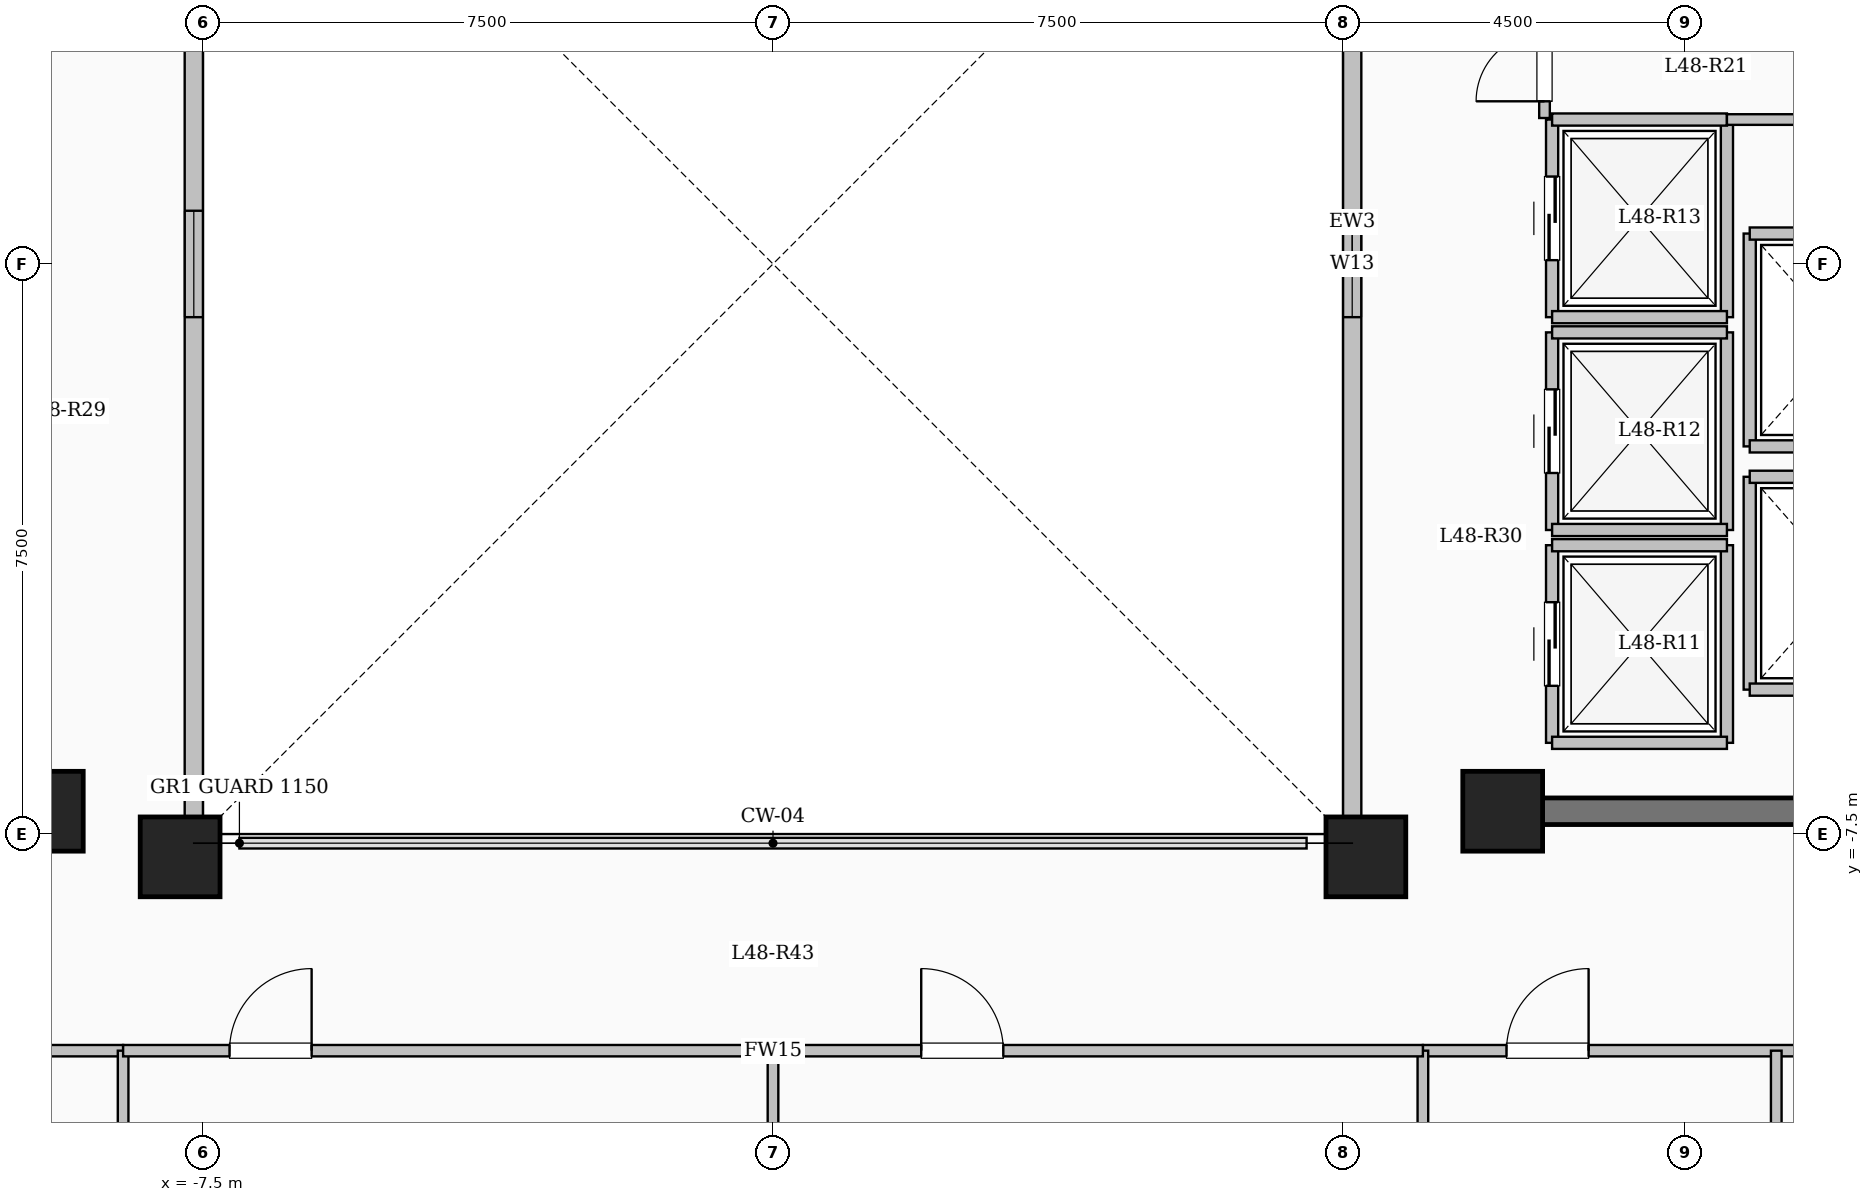
"""IFC4 building model, lengths in metres.
Left out: names, types, materials, properties, quantities, classifications, styles, units other than length and angle.
Written with IfcOpenShell. Run it as: python <this file> out.ifc"""

import sys

from ifc_helpers import new_model, si_unit, direction, frame, frame_2d, origin, origin_2d, place, context, subcontext, project, spatial, rectangle, extrude, element, fill, save


model = new_model("IFC4")
c1 = context("Model", 3, precision=1e-05, world=origin(), true_north=direction((0.0, 1.0)))
c2 = subcontext(c1, "Body", "Model", "MODEL_VIEW")
j1 = project(units=[si_unit("LENGTHUNIT", "METRE"), si_unit("PLANEANGLEUNIT", "RADIAN")], contexts=[c1])
p1 = place(None, origin())
s1 = spatial("IfcSite", under=j1, at=p1, CompositionType="ELEMENT")
p2 = place(p1, origin())
s2 = spatial("IfcBuilding", under=s1, at=p2, CompositionType="ELEMENT")
p3 = place(p2, frame((0.0, 0.0, 177.3)))
s3 = spatial("IfcBuildingStorey", under=s2, at=p3, CompositionType="ELEMENT", Elevation=177.3)
for number, where, z_axis, x_axis in (
    (1, (-7.8, -7.8, 0.0), (0.0, 0.0, 1.0), (1.0, 0.0, 0.0)),
    (2, (7.8, -7.8, 0.0), (0.0, 0.0, 1.0), (1.0, 0.0, 0.0)),
    (3, (-9.6, -7.2, 0.0), (0.0, 0.0, 1.0), (1.0, 0.0, 0.0)),
    (4, (9.6, -7.2, 0.0), (0.0, 0.0, 1.0), (1.0, 0.0, 0.0)),
):
    element("IfcColumn", number, at=place(p3, frame(where, z_axis=z_axis, x_axis=x_axis)), inside=s3, PredefinedType="COLUMN", context=c2, shape_type="SweptSolid", body=[
        extrude(rectangle(XDim=1.05, YDim=1.05, at=origin_2d()), origin(), (0.0, 0.0, 1.0), 4.5),
    ])
p4 = place(p3, frame((7.62, -7.62, 0.0), z_axis=(0.0, 0.0, 1.0), x_axis=(0.0, 1.0, 0.0)))
e5 = element("IfcWall", 5, at=p4, inside=s3, PredefinedType="SOLIDWALL", context=c2, shape_type="SweptSolid", body=[
    extrude(rectangle(XDim=15.24, YDim=0.24, at=frame_2d((7.62, 0.0))), origin(), (0.0, 0.0, 1.0), 4.2),
])
p5 = place(p4, frame((6.92, 0.0, 0.95)))
e6 = element("IfcOpeningElement", 6, at=p5, cuts=e5, PredefinedType="OPENING", context=c2, shape_type="SweptSolid", body=[
    extrude(rectangle(XDim=1.4, YDim=1.5, at=frame_2d((0.7, 0.75))), frame((0.0, 0.13, 0.0), z_axis=(0.0, -1.0, 0.0), x_axis=(1.0, 0.0, 0.0)), (0.0, 0.0, 1.0), 0.26),
])
p6 = place(p3, frame((-7.62, 7.62, 0.0), z_axis=(0.0, 0.0, 1.0), x_axis=(0.0, -1.0, 0.0)))
e7 = element("IfcWall", 7, at=p6, inside=s3, PredefinedType="SOLIDWALL", context=c2, shape_type="SweptSolid", body=[
    extrude(rectangle(XDim=15.24, YDim=0.24, at=frame_2d((7.62, 0.0))), origin(), (0.0, 0.0, 1.0), 4.2),
])
p7 = place(p6, frame((6.92, 0.0, 0.95)))
e8 = element("IfcOpeningElement", 8, at=p7, cuts=e7, PredefinedType="OPENING", context=c2, shape_type="SweptSolid", body=[
    extrude(rectangle(XDim=1.4, YDim=1.5, at=frame_2d((0.7, 0.75))), frame((0.0, 0.13, 0.0), z_axis=(0.0, -1.0, 0.0), x_axis=(1.0, 0.0, 0.0)), (0.0, 0.0, 1.0), 0.26),
])
p8 = place(p3, frame((10.25, -6.3, 0.0), z_axis=(0.0, 0.0, 1.0), x_axis=(0.0, 1.0, 0.0)))
e9 = element("IfcWall", 9, at=p8, inside=s3, PredefinedType="SOLIDWALL", context=c2, shape_type="SweptSolid", body=[
    extrude(rectangle(XDim=2.6, YDim=0.16, at=frame_2d((1.3, 0.0))), origin(), (0.0, 0.0, 1.0), 4.2),
])
p9 = place(p8, frame((0.75, 0.0, 0.0)))
e10 = element("IfcOpeningElement", 10, at=p9, cuts=e9, PredefinedType="OPENING", context=c2, shape_type="SweptSolid", body=[
    extrude(rectangle(XDim=1.1, YDim=2.15, at=frame_2d((0.55, 1.075))), frame((0.0, 0.09, 0.0), z_axis=(0.0, -1.0, 0.0), x_axis=(1.0, 0.0, 0.0)), (0.0, 0.0, 1.0), 0.18),
])
p10 = place(p3, frame((12.55, -6.3, 0.0), z_axis=(0.0, 0.0, 1.0), x_axis=(0.0, 1.0, 0.0)))
e11 = element("IfcWall", 11, at=p10, inside=s3, PredefinedType="SOLIDWALL", context=c2, shape_type="SweptSolid", body=[
    extrude(rectangle(XDim=2.6, YDim=0.16, at=frame_2d((1.3, 0.0))), origin(), (0.0, 0.0, 1.0), 4.2),
])
for number, where, z_axis, x_axis in (
    (12, (10.25, -6.3, 0.0), (0.0, 0.0, 1.0), (1.0, 0.0, 0.0)),
    (13, (10.25, -3.7, 0.0), (0.0, 0.0, 1.0), (1.0, 0.0, 0.0)),
):
    element("IfcWall", number, at=place(p3, frame(where, z_axis=z_axis, x_axis=x_axis)), inside=s3, PredefinedType="SOLIDWALL", context=c2, shape_type="SweptSolid", body=[
        extrude(rectangle(XDim=2.3, YDim=0.16, at=frame_2d((1.15, 0.0))), origin(), (0.0, 0.0, 1.0), 4.2),
    ])
p11 = place(p3, frame((10.25, -3.5, 0.0), z_axis=(0.0, 0.0, 1.0), x_axis=(0.0, 1.0, 0.0)))
e14 = element("IfcWall", 14, at=p11, inside=s3, PredefinedType="SOLIDWALL", context=c2, shape_type="SweptSolid", body=[
    extrude(rectangle(XDim=2.6, YDim=0.16, at=frame_2d((1.3, 0.0))), origin(), (0.0, 0.0, 1.0), 4.2),
])
p12 = place(p11, frame((0.75, 0.0, 0.0)))
e15 = element("IfcOpeningElement", 15, at=p12, cuts=e14, PredefinedType="OPENING", context=c2, shape_type="SweptSolid", body=[
    extrude(rectangle(XDim=1.1, YDim=2.15, at=frame_2d((0.55, 1.075))), frame((0.0, 0.09, 0.0), z_axis=(0.0, -1.0, 0.0), x_axis=(1.0, 0.0, 0.0)), (0.0, 0.0, 1.0), 0.18),
])
p13 = place(p3, frame((12.55, -3.5, 0.0), z_axis=(0.0, 0.0, 1.0), x_axis=(0.0, 1.0, 0.0)))
e16 = element("IfcWall", 16, at=p13, inside=s3, PredefinedType="SOLIDWALL", context=c2, shape_type="SweptSolid", body=[
    extrude(rectangle(XDim=2.6, YDim=0.16, at=frame_2d((1.3, 0.0))), origin(), (0.0, 0.0, 1.0), 4.2),
])
for number, where, z_axis, x_axis in (
    (17, (10.25, -3.5, 0.0), (0.0, 0.0, 1.0), (1.0, 0.0, 0.0)),
    (18, (10.25, -0.9, 0.0), (0.0, 0.0, 1.0), (1.0, 0.0, 0.0)),
):
    element("IfcWall", number, at=place(p3, frame(where, z_axis=z_axis, x_axis=x_axis)), inside=s3, PredefinedType="SOLIDWALL", context=c2, shape_type="SweptSolid", body=[
        extrude(rectangle(XDim=2.3, YDim=0.16, at=frame_2d((1.15, 0.0))), origin(), (0.0, 0.0, 1.0), 4.2),
    ])
p14 = place(p3, frame((10.25, -0.7, 0.0), z_axis=(0.0, 0.0, 1.0), x_axis=(0.0, 1.0, 0.0)))
e19 = element("IfcWall", 19, at=p14, inside=s3, PredefinedType="SOLIDWALL", context=c2, shape_type="SweptSolid", body=[
    extrude(rectangle(XDim=2.6, YDim=0.16, at=frame_2d((1.3, 0.0))), origin(), (0.0, 0.0, 1.0), 4.2),
])
p15 = place(p14, frame((0.75, 0.0, 0.0)))
e20 = element("IfcOpeningElement", 20, at=p15, cuts=e19, PredefinedType="OPENING", context=c2, shape_type="SweptSolid", body=[
    extrude(rectangle(XDim=1.1, YDim=2.15, at=frame_2d((0.55, 1.075))), frame((0.0, 0.09, 0.0), z_axis=(0.0, -1.0, 0.0), x_axis=(1.0, 0.0, 0.0)), (0.0, 0.0, 1.0), 0.18),
])
p16 = place(p3, frame((12.55, -0.7, 0.0), z_axis=(0.0, 0.0, 1.0), x_axis=(0.0, 1.0, 0.0)))
e21 = element("IfcWall", 21, at=p16, inside=s3, PredefinedType="SOLIDWALL", context=c2, shape_type="SweptSolid", body=[
    extrude(rectangle(XDim=2.6, YDim=0.16, at=frame_2d((1.3, 0.0))), origin(), (0.0, 0.0, 1.0), 4.2),
])
for number, where, z_axis, x_axis in (
    (22, (10.25, -0.7, 0.0), (0.0, 0.0, 1.0), (1.0, 0.0, 0.0)),
    (23, (10.25, 1.9, 0.0), (0.0, 0.0, 1.0), (1.0, 0.0, 0.0)),
):
    element("IfcWall", number, at=place(p3, frame(where, z_axis=z_axis, x_axis=x_axis)), inside=s3, PredefinedType="SOLIDWALL", context=c2, shape_type="SweptSolid", body=[
        extrude(rectangle(XDim=2.3, YDim=0.16, at=frame_2d((1.15, 0.0))), origin(), (0.0, 0.0, 1.0), 4.2),
    ])
p17 = place(p3, frame((12.85, -5.6, 0.0), z_axis=(0.0, 0.0, 1.0), x_axis=(0.0, 1.0, 0.0)))
e24 = element("IfcWall", 24, at=p17, inside=s3, PredefinedType="SOLIDWALL", context=c2, shape_type="SweptSolid", body=[
    extrude(rectangle(XDim=2.8, YDim=0.16, at=frame_2d((1.4, 0.0))), origin(), (0.0, 0.0, 1.0), 4.2),
])
for number, where, z_axis, x_axis in (
    (25, (12.85, -5.6, 0.0), (0.0, 0.0, 1.0), (1.0, 0.0, 0.0)),
    (26, (12.85, -2.8, 0.0), (0.0, 0.0, 1.0), (1.0, 0.0, 0.0)),
):
    element("IfcWall", number, at=place(p3, frame(where, z_axis=z_axis, x_axis=x_axis)), inside=s3, PredefinedType="SOLIDWALL", context=c2, shape_type="SweptSolid", body=[
        extrude(rectangle(XDim=2.5, YDim=0.16, at=frame_2d((1.25, 0.0))), origin(), (0.0, 0.0, 1.0), 4.2),
    ])
p18 = place(p3, frame((12.85, -2.4, 0.0), z_axis=(0.0, 0.0, 1.0), x_axis=(0.0, 1.0, 0.0)))
e27 = element("IfcWall", 27, at=p18, inside=s3, PredefinedType="SOLIDWALL", context=c2, shape_type="SweptSolid", body=[
    extrude(rectangle(XDim=2.8, YDim=0.16, at=frame_2d((1.4, 0.0))), origin(), (0.0, 0.0, 1.0), 4.2),
])
for number, where, z_axis, x_axis in (
    (28, (12.85, -2.4, 0.0), (0.0, 0.0, 1.0), (1.0, 0.0, 0.0)),
    (29, (12.85, 0.4, 0.0), (0.0, 0.0, 1.0), (1.0, 0.0, 0.0)),
):
    element("IfcWall", number, at=place(p3, frame(where, z_axis=z_axis, x_axis=x_axis)), inside=s3, PredefinedType="SOLIDWALL", context=c2, shape_type="SweptSolid", body=[
        extrude(rectangle(XDim=2.5, YDim=0.16, at=frame_2d((1.25, 0.0))), origin(), (0.0, 0.0, 1.0), 4.2),
    ])
p19 = place(p3, frame((10.075, -7.2, 0.0), z_axis=(0.0, 0.0, 1.0), x_axis=(1.0, 0.0, 0.0)))
e30 = element("IfcWall", 30, at=p19, inside=s3, PredefinedType="SHEAR", context=c2, shape_type="SweptSolid", body=[
    extrude(rectangle(XDim=8.55, YDim=0.35, at=frame_2d((4.275, 0.0))), origin(), (0.0, 0.0, 1.0), 4.5),
])
p20 = place(p3, frame((12.55, 1.9, 0.0), z_axis=(0.0, 0.0, 1.0), x_axis=(1.0, 0.0, 0.0)))
e31 = element("IfcWall", 31, at=p20, inside=s3, PredefinedType="PARTITIONING", context=c2, shape_type="SweptSolid", body=[
    extrude(rectangle(XDim=2.85, YDim=0.14, at=frame_2d((1.425, 0.0))), origin(), (0.0, 0.0, 1.0), 4.2),
])
p21 = place(p3, frame((10.15, 1.92, 0.0), z_axis=(0.0, 0.0, 1.0), x_axis=(0.0, 1.0, 0.0)))
e32 = element("IfcWall", 32, at=p21, inside=s3, PredefinedType="PARTITIONING", context=c2, shape_type="SweptSolid", body=[
    extrude(rectangle(XDim=1.33, YDim=0.14, at=frame_2d((0.665, 0.0))), origin(), (0.0, 0.0, 1.0), 4.2),
])
p22 = place(p21, frame((0.22, 0.0, 0.0)))
e33 = element("IfcOpeningElement", 33, at=p22, cuts=e32, PredefinedType="OPENING", context=c2, shape_type="SweptSolid", body=[
    extrude(rectangle(XDim=0.9, YDim=2.08, at=frame_2d((0.45, 1.04))), frame((0.0, 0.08, 0.0), z_axis=(0.0, -1.0, 0.0), x_axis=(1.0, 0.0, 0.0)), (0.0, 0.0, 1.0), 0.16),
])
p23 = place(p3, frame((-19.55, -10.35, 0.0), z_axis=(0.0, 0.0, 1.0), x_axis=(1.0, 0.0, 0.0)))
e34 = element("IfcWall", 34, at=p23, inside=s3, PredefinedType="PARTITIONING", context=c2, shape_type="SweptSolid", body=[
    extrude(rectangle(XDim=11.0, YDim=0.15, at=frame_2d((5.5, 0.0))), origin(), (0.0, 0.0, 1.0), 4.2),
])
p24 = place(p23, frame((1.1, 0.0, 0.0)))
e35 = element("IfcOpeningElement", 35, at=p24, cuts=e34, PredefinedType="OPENING", context=c2, shape_type="SweptSolid", body=[
    extrude(rectangle(XDim=1.08, YDim=2.15, at=frame_2d((0.54, 1.075))), frame((0.0, 0.085, 0.0), z_axis=(0.0, -1.0, 0.0), x_axis=(1.0, 0.0, 0.0)), (0.0, 0.0, 1.0), 0.17),
])
p25 = place(p23, frame((6.156, 0.0, 0.0)))
e36 = element("IfcOpeningElement", 36, at=p25, cuts=e34, PredefinedType="OPENING", context=c2, shape_type="SweptSolid", body=[
    extrude(rectangle(XDim=1.08, YDim=2.15, at=frame_2d((0.54, 1.075))), frame((0.0, 0.085, 0.0), z_axis=(0.0, -1.0, 0.0), x_axis=(1.0, 0.0, 0.0)), (0.0, 0.0, 1.0), 0.17),
])
p26 = place(p3, frame((8.55, -10.35, 0.0), z_axis=(0.0, 0.0, 1.0), x_axis=(1.0, 0.0, 0.0)))
e37 = element("IfcWall", 37, at=p26, inside=s3, PredefinedType="PARTITIONING", context=c2, shape_type="SweptSolid", body=[
    extrude(rectangle(XDim=11.0, YDim=0.15, at=frame_2d((5.5, 0.0))), origin(), (0.0, 0.0, 1.0), 4.2),
])
p27 = place(p26, frame((1.1, 0.0, 0.0)))
e38 = element("IfcOpeningElement", 38, at=p27, cuts=e37, PredefinedType="OPENING", context=c2, shape_type="SweptSolid", body=[
    extrude(rectangle(XDim=1.08, YDim=2.15, at=frame_2d((0.54, 1.075))), frame((0.0, 0.085, 0.0), z_axis=(0.0, -1.0, 0.0), x_axis=(1.0, 0.0, 0.0)), (0.0, 0.0, 1.0), 0.17),
])
p28 = place(p26, frame((5.649, 0.0, 0.0)))
e39 = element("IfcOpeningElement", 39, at=p28, cuts=e37, PredefinedType="OPENING", context=c2, shape_type="SweptSolid", body=[
    extrude(rectangle(XDim=1.2, YDim=2.15, at=frame_2d((0.6, 1.075))), frame((0.0, 0.085, 0.0), z_axis=(0.0, -1.0, 0.0), x_axis=(1.0, 0.0, 0.0)), (0.0, 0.0, 1.0), 0.17),
])
for number, where, z_axis, x_axis in (
    (40, (-8.55, -21.804, 0.0), (0.0, 0.0, 1.0), (0.0, 1.0, 0.0)),
    (41, (8.55, -21.804, 0.0), (0.0, 0.0, 1.0), (0.0, 1.0, 0.0)),
):
    element("IfcWall", number, at=place(p3, frame(where, z_axis=z_axis, x_axis=x_axis)), inside=s3, PredefinedType="PARTITIONING", context=c2, shape_type="SweptSolid", body=[
        extrude(rectangle(XDim=11.454, YDim=0.14, at=frame_2d((5.727, 0.0))), origin(), (0.0, 0.0, 1.0), 4.2),
    ])
p29 = place(p3, frame((13.199, -21.2, 0.0), z_axis=(0.0, 0.0, 1.0), x_axis=(0.0, 1.0, 0.0)))
e42 = element("IfcWall", 42, at=p29, inside=s3, PredefinedType="PARTITIONING", context=c2, shape_type="SweptSolid", body=[
    extrude(rectangle(XDim=10.85, YDim=0.14, at=frame_2d((5.425, 0.0))), origin(), (0.0, 0.0, 1.0), 4.2),
])
p30 = place(p3, frame((-8.55, -10.35, 0.0), z_axis=(0.0, 0.0, 1.0), x_axis=(1.0, 0.0, 0.0)))
e43 = element("IfcWall", 43, at=p30, inside=s3, PredefinedType="PARTITIONING", context=c2, shape_type="SweptSolid", body=[
    extrude(rectangle(XDim=17.1, YDim=0.15, at=frame_2d((8.55, 0.0))), origin(), (0.0, 0.0, 1.0), 4.2),
])
p31 = place(p30, frame((1.4, 0.0, 0.0)))
e44 = element("IfcOpeningElement", 44, at=p31, cuts=e43, PredefinedType="OPENING", context=c2, shape_type="SweptSolid", body=[
    extrude(rectangle(XDim=1.08, YDim=2.15, at=frame_2d((0.54, 1.075))), frame((0.0, 0.085, 0.0), z_axis=(0.0, -1.0, 0.0), x_axis=(1.0, 0.0, 0.0)), (0.0, 0.0, 1.0), 0.17),
])
p32 = place(p30, frame((10.5, 0.0, 0.0)))
e45 = element("IfcOpeningElement", 45, at=p32, cuts=e43, PredefinedType="OPENING", context=c2, shape_type="SweptSolid", body=[
    extrude(rectangle(XDim=1.08, YDim=2.15, at=frame_2d((0.54, 1.075))), frame((0.0, 0.085, 0.0), z_axis=(0.0, -1.0, 0.0), x_axis=(1.0, 0.0, 0.0)), (0.0, 0.0, 1.0), 0.17),
])
p33 = place(p3, frame((0.0, -22.68, 0.0), z_axis=(0.0, 0.0, 1.0), x_axis=(0.0, 1.0, 0.0)))
e46 = element("IfcWall", 46, at=p33, inside=s3, PredefinedType="PARTITIONING", context=c2, shape_type="SweptSolid", body=[
    extrude(rectangle(XDim=12.33, YDim=0.14, at=frame_2d((6.165, 0.0))), origin(), (0.0, 0.0, 1.0), 4.2),
])
p34 = place(p5, origin())
e47 = element("IfcWindow", 47, at=p34, inside=s3, PartitioningType="SINGLE_PANEL", PredefinedType="WINDOW", context=c2, shape_type="SweptSolid", body=[
    extrude(rectangle(XDim=1.4, YDim=1.5, at=frame_2d((0.7, 0.75))), frame((0.0, 0.03, 0.0), z_axis=(0.0, -1.0, 0.0), x_axis=(1.0, 0.0, 0.0)), (0.0, 0.0, 1.0), 0.06),
])
fill(e6, e47)
p35 = place(p7, origin())
e48 = element("IfcWindow", 48, at=p35, inside=s3, PartitioningType="SINGLE_PANEL", PredefinedType="WINDOW", context=c2, shape_type="SweptSolid", body=[
    extrude(rectangle(XDim=1.4, YDim=1.5, at=frame_2d((0.7, 0.75))), frame((0.0, 0.03, 0.0), z_axis=(0.0, -1.0, 0.0), x_axis=(1.0, 0.0, 0.0)), (0.0, 0.0, 1.0), 0.06),
])
fill(e8, e48)
p36 = place(p9, origin())
e49 = element("IfcDoor", 49, at=p36, inside=s3, OperationType="SLIDING_TO_LEFT", PredefinedType="DOOR", context=c2, shape_type="SweptSolid", body=[
    extrude(rectangle(XDim=1.1, YDim=2.15, at=frame_2d((0.55, 1.075))), frame((0.0, 0.025, 0.0), z_axis=(0.0, -1.0, 0.0), x_axis=(1.0, 0.0, 0.0)), (0.0, 0.0, 1.0), 0.05),
])
fill(e10, e49)
p37 = place(p12, origin())
e50 = element("IfcDoor", 50, at=p37, inside=s3, OperationType="SLIDING_TO_LEFT", PredefinedType="DOOR", context=c2, shape_type="SweptSolid", body=[
    extrude(rectangle(XDim=1.1, YDim=2.15, at=frame_2d((0.55, 1.075))), frame((0.0, 0.025, 0.0), z_axis=(0.0, -1.0, 0.0), x_axis=(1.0, 0.0, 0.0)), (0.0, 0.0, 1.0), 0.05),
])
fill(e15, e50)
p38 = place(p15, origin())
e51 = element("IfcDoor", 51, at=p38, inside=s3, OperationType="SLIDING_TO_LEFT", PredefinedType="DOOR", context=c2, shape_type="SweptSolid", body=[
    extrude(rectangle(XDim=1.1, YDim=2.15, at=frame_2d((0.55, 1.075))), frame((0.0, 0.025, 0.0), z_axis=(0.0, -1.0, 0.0), x_axis=(1.0, 0.0, 0.0)), (0.0, 0.0, 1.0), 0.05),
])
fill(e20, e51)
p39 = place(p22, origin())
e52 = element("IfcDoor", 52, at=p39, inside=s3, OperationType="SINGLE_SWING_LEFT", PredefinedType="DOOR", context=c2, shape_type="SweptSolid", body=[
    extrude(rectangle(XDim=0.9, YDim=2.08, at=frame_2d((0.45, 1.04))), frame((0.0, 0.025, 0.0), z_axis=(0.0, -1.0, 0.0), x_axis=(1.0, 0.0, 0.0)), (0.0, 0.0, 1.0), 0.05),
])
fill(e33, e52)
p40 = place(p31, origin())
e53 = element("IfcDoor", 53, at=p40, inside=s3, OperationType="SINGLE_SWING_RIGHT", PredefinedType="DOOR", context=c2, shape_type="SweptSolid", body=[
    extrude(rectangle(XDim=1.08, YDim=2.15, at=frame_2d((0.54, 1.075))), frame((0.0, 0.025, 0.0), z_axis=(0.0, -1.0, 0.0), x_axis=(1.0, 0.0, 0.0)), (0.0, 0.0, 1.0), 0.05),
])
fill(e44, e53)
p41 = place(p32, origin())
e54 = element("IfcDoor", 54, at=p41, inside=s3, OperationType="SINGLE_SWING_LEFT", PredefinedType="DOOR", context=c2, shape_type="SweptSolid", body=[
    extrude(rectangle(XDim=1.08, YDim=2.15, at=frame_2d((0.54, 1.075))), frame((0.0, 0.025, 0.0), z_axis=(0.0, -1.0, 0.0), x_axis=(1.0, 0.0, 0.0)), (0.0, 0.0, 1.0), 0.05),
])
fill(e45, e54)
p42 = place(p27, origin())
e55 = element("IfcDoor", 55, at=p42, inside=s3, OperationType="SINGLE_SWING_RIGHT", PredefinedType="DOOR", context=c2, shape_type="SweptSolid", body=[
    extrude(rectangle(XDim=1.08, YDim=2.15, at=frame_2d((0.54, 1.075))), frame((0.0, 0.025, 0.0), z_axis=(0.0, -1.0, 0.0), x_axis=(1.0, 0.0, 0.0)), (0.0, 0.0, 1.0), 0.05),
])
fill(e38, e55)
save(model, sys.argv[1])
